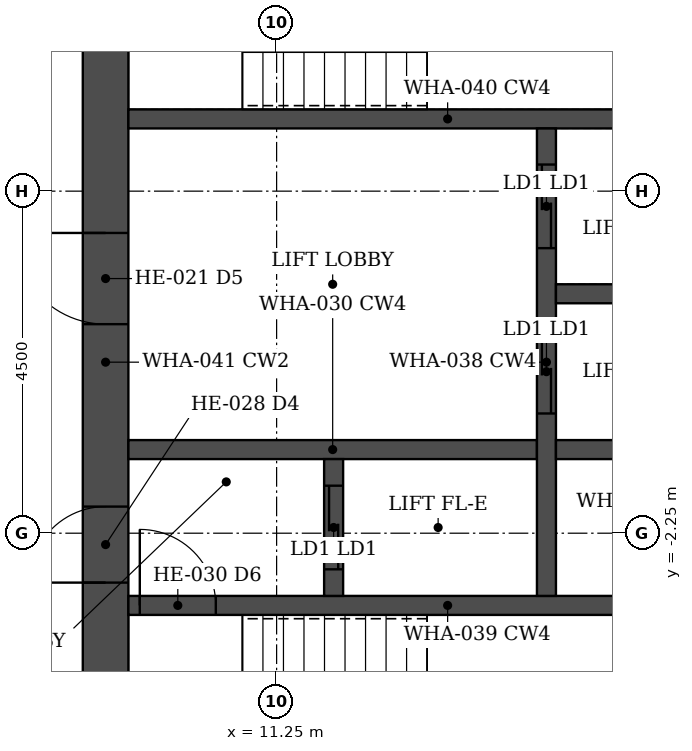
"""IFC4 building model, lengths in metres.
Left out: names, types, materials, properties, quantities, classifications, styles, units other than length and angle.
Written with IfcOpenShell. Run it as: python <this file> out.ifc"""

import sys

from ifc_helpers import new_model, si_unit, direction, frame, frame_2d, origin, place, context, subcontext, project, spatial, rectangle, extrude, element, fill, save


model = new_model("IFC4")
c1 = context("Model", 3, precision=1e-05, world=origin(), true_north=direction((0.0, 1.0)))
c2 = subcontext(c1, "Body", "Model", "MODEL_VIEW")
j1 = project(units=[si_unit("LENGTHUNIT", "METRE"), si_unit("PLANEANGLEUNIT", "RADIAN")], contexts=[c1])
p1 = place(None, origin())
s1 = spatial("IfcSite", under=j1, at=p1, CompositionType="ELEMENT")
p2 = place(p1, origin())
s2 = spatial("IfcBuilding", under=s1, at=p2, CompositionType="ELEMENT")
p3 = place(p2, frame((0.0, 0.0, 161.6)))
s3 = spatial("IfcBuildingStorey", under=s2, at=p3, CompositionType="ELEMENT", Elevation=161.6)
p4 = place(p3, frame((9.0, -6.45, 0.0), z_axis=(0.0, 0.0, 1.0), x_axis=(0.0, 1.0, 0.0)))
e1 = element("IfcWall", 1, at=p4, inside=s3, PredefinedType="SHEAR", context=c2, shape_type="SweptSolid", body=[
    extrude(rectangle(XDim=12.9, YDim=0.6, at=frame_2d((6.45, 0.0))), origin(), (0.0, 0.0, 1.0), 3.6),
])
p5 = place(p4, frame((3.55, 0.0, 0.0)))
e2 = element("IfcOpeningElement", 2, at=p5, cuts=e1, PredefinedType="OPENING", context=c2, shape_type="SweptSolid", body=[
    extrude(rectangle(XDim=1.0, YDim=2.1, at=frame_2d((0.5, 1.05))), frame((0.0, 0.31, 0.0), z_axis=(0.0, -1.0, 0.0), x_axis=(1.0, 0.0, 0.0)), (0.0, 0.0, 1.0), 0.62),
])
p6 = place(p4, frame((6.95, 0.0, 0.0)))
e3 = element("IfcOpeningElement", 3, at=p6, cuts=e1, PredefinedType="OPENING", context=c2, shape_type="SweptSolid", body=[
    extrude(rectangle(XDim=1.2, YDim=2.1, at=frame_2d((0.6, 1.05))), frame((0.0, 0.31, 0.0), z_axis=(0.0, -1.0, 0.0), x_axis=(1.0, 0.0, 0.0)), (0.0, 0.0, 1.0), 0.62),
])
p7 = place(p4, frame((10.85, 0.0, 0.0)))
e4 = element("IfcOpeningElement", 4, at=p7, cuts=e1, PredefinedType="OPENING", context=c2, shape_type="SweptSolid", body=[
    extrude(rectangle(XDim=1.0, YDim=2.1, at=frame_2d((0.5, 1.05))), frame((0.0, 0.31, 0.0), z_axis=(0.0, -1.0, 0.0), x_axis=(1.0, 0.0, 0.0)), (0.0, 0.0, 1.0), 0.62),
])
p8 = place(p3, frame((9.3, -3.2, 0.0), z_axis=(0.0, 0.0, 1.0), x_axis=(1.0, 0.0, 0.0)))
e5 = element("IfcWall", 5, at=p8, inside=s3, PredefinedType="SHEAR", context=c2, shape_type="SweptSolid", body=[
    extrude(rectangle(XDim=8.4, YDim=0.25, at=frame_2d((4.2, 0.0))), origin(), (0.0, 0.0, 1.0), 3.6),
])
p9 = place(p8, frame((0.15, 0.0, 0.0)))
e6 = element("IfcOpeningElement", 6, at=p9, cuts=e5, PredefinedType="OPENING", context=c2, shape_type="SweptSolid", body=[
    extrude(rectangle(XDim=1.0, YDim=2.1, at=frame_2d((0.5, 1.05))), frame((0.0, 0.135, 0.0), z_axis=(0.0, -1.0, 0.0), x_axis=(1.0, 0.0, 0.0)), (0.0, 0.0, 1.0), 0.27),
])
p10 = place(p3, frame((9.3, 3.2, 0.0), z_axis=(0.0, 0.0, 1.0), x_axis=(1.0, 0.0, 0.0)))
e7 = element("IfcWall", 7, at=p10, inside=s3, PredefinedType="SHEAR", context=c2, shape_type="SweptSolid", body=[
    extrude(rectangle(XDim=8.4, YDim=0.25, at=frame_2d((4.2, 0.0))), origin(), (0.0, 0.0, 1.0), 3.6),
])
p11 = place(p3, frame((9.3, -1.15, 0.0), z_axis=(0.0, 0.0, 1.0), x_axis=(1.0, 0.0, 0.0)))
e8 = element("IfcWall", 8, at=p11, inside=s3, PredefinedType="SHEAR", context=c2, shape_type="SweptSolid", body=[
    extrude(rectangle(XDim=5.375, YDim=0.25, at=frame_2d((2.688, 0.0))), origin(), (0.0, 0.0, 1.0), 3.6),
])
p12 = place(p3, frame((12.0, -3.075, 0.0), z_axis=(0.0, 0.0, 1.0), x_axis=(0.0, 1.0, 0.0)))
e9 = element("IfcWall", 9, at=p12, inside=s3, PredefinedType="SHEAR", context=c2, shape_type="SweptSolid", body=[
    extrude(rectangle(XDim=1.8, YDim=0.25, at=frame_2d((0.9, 0.0))), origin(), (0.0, 0.0, 1.0), 3.6),
])
p13 = place(p12, frame((0.35, 0.0, 0.0)))
e10 = element("IfcOpeningElement", 10, at=p13, cuts=e9, PredefinedType="OPENING", context=c2, shape_type="SweptSolid", body=[
    extrude(rectangle(XDim=1.1, YDim=2.1, at=frame_2d((0.55, 1.05))), frame((0.0, 0.135, 0.0), z_axis=(0.0, -1.0, 0.0), x_axis=(1.0, 0.0, 0.0)), (0.0, 0.0, 1.0), 0.27),
])
p14 = place(p3, frame((14.8, -3.075, 0.0), z_axis=(0.0, 0.0, 1.0), x_axis=(0.0, 1.0, 0.0)))
e11 = element("IfcWall", 11, at=p14, inside=s3, PredefinedType="SHEAR", context=c2, shape_type="SweptSolid", body=[
    extrude(rectangle(XDim=6.15, YDim=0.25, at=frame_2d((3.075, 0.0))), origin(), (0.0, 0.0, 1.0), 3.6),
])
p15 = place(p14, frame((2.4, 0.0, 0.0)))
e12 = element("IfcOpeningElement", 12, at=p15, cuts=e11, PredefinedType="OPENING", context=c2, shape_type="SweptSolid", body=[
    extrude(rectangle(XDim=1.1, YDim=2.1, at=frame_2d((0.55, 1.05))), frame((0.0, 0.135, 0.0), z_axis=(0.0, -1.0, 0.0), x_axis=(1.0, 0.0, 0.0)), (0.0, 0.0, 1.0), 0.27),
])
p16 = place(p14, frame((4.575, 0.0, 0.0)))
e13 = element("IfcOpeningElement", 13, at=p16, cuts=e11, PredefinedType="OPENING", context=c2, shape_type="SweptSolid", body=[
    extrude(rectangle(XDim=1.1, YDim=2.1, at=frame_2d((0.55, 1.05))), frame((0.0, 0.135, 0.0), z_axis=(0.0, -1.0, 0.0), x_axis=(1.0, 0.0, 0.0)), (0.0, 0.0, 1.0), 0.27),
])
for number, where, z_axis, x_axis in (
    (14, (14.925, -1.15, 0.0), (0.0, 0.0, 1.0), (1.0, 0.0, 0.0)),
    (15, (14.925, 0.9, 0.0), (0.0, 0.0, 1.0), (1.0, 0.0, 0.0)),
):
    element("IfcWall", number, at=place(p3, frame(where, z_axis=z_axis, x_axis=x_axis)), inside=s3, PredefinedType="SHEAR", context=c2, shape_type="SweptSolid", body=[
        extrude(rectangle(XDim=2.775, YDim=0.25, at=frame_2d((1.387, 0.0))), origin(), (0.0, 0.0, 1.0), 3.6),
    ])
p17 = place(p5, origin())
e16 = element("IfcDoor", 16, at=p17, inside=s3, OperationType="SINGLE_SWING_LEFT", PredefinedType="DOOR", context=c2, shape_type="SweptSolid", body=[
    extrude(rectangle(XDim=1.0, YDim=2.1, at=frame_2d((0.5, 1.05))), frame((0.0, 0.025, 0.0), z_axis=(0.0, -1.0, 0.0), x_axis=(1.0, 0.0, 0.0)), (0.0, 0.0, 1.0), 0.05),
])
fill(e2, e16)
p18 = place(p9, origin())
e17 = element("IfcDoor", 17, at=p18, inside=s3, OperationType="SINGLE_SWING_LEFT", PredefinedType="DOOR", context=c2, shape_type="SweptSolid", body=[
    extrude(rectangle(XDim=1.0, YDim=2.1, at=frame_2d((0.5, 1.05))), frame((0.0, 0.025, 0.0), z_axis=(0.0, -1.0, 0.0), x_axis=(1.0, 0.0, 0.0)), (0.0, 0.0, 1.0), 0.05),
])
fill(e6, e17)
p19 = place(p6, origin())
e18 = element("IfcDoor", 18, at=p19, inside=s3, OperationType="SINGLE_SWING_RIGHT", PredefinedType="DOOR", context=c2, shape_type="SweptSolid", body=[
    extrude(rectangle(XDim=1.2, YDim=2.1, at=frame_2d((0.6, 1.05))), frame((0.0, 0.025, 0.0), z_axis=(0.0, -1.0, 0.0), x_axis=(1.0, 0.0, 0.0)), (0.0, 0.0, 1.0), 0.05),
])
fill(e3, e18)
p20 = place(p13, origin())
e19 = element("IfcDoor", 19, at=p20, inside=s3, OperationType="DOUBLE_DOOR_SLIDING", PredefinedType="DOOR", context=c2, shape_type="SweptSolid", body=[
    extrude(rectangle(XDim=1.1, YDim=2.1, at=frame_2d((0.55, 1.05))), frame((0.0, 0.025, 0.0), z_axis=(0.0, -1.0, 0.0), x_axis=(1.0, 0.0, 0.0)), (0.0, 0.0, 1.0), 0.05),
])
fill(e10, e19)
p21 = place(p15, origin())
e20 = element("IfcDoor", 20, at=p21, inside=s3, OperationType="DOUBLE_DOOR_SLIDING", PredefinedType="DOOR", context=c2, shape_type="SweptSolid", body=[
    extrude(rectangle(XDim=1.1, YDim=2.1, at=frame_2d((0.55, 1.05))), frame((0.0, 0.025, 0.0), z_axis=(0.0, -1.0, 0.0), x_axis=(1.0, 0.0, 0.0)), (0.0, 0.0, 1.0), 0.05),
])
fill(e12, e20)
p22 = place(p16, origin())
e21 = element("IfcDoor", 21, at=p22, inside=s3, OperationType="DOUBLE_DOOR_SLIDING", PredefinedType="DOOR", context=c2, shape_type="SweptSolid", body=[
    extrude(rectangle(XDim=1.1, YDim=2.1, at=frame_2d((0.55, 1.05))), frame((0.0, 0.025, 0.0), z_axis=(0.0, -1.0, 0.0), x_axis=(1.0, 0.0, 0.0)), (0.0, 0.0, 1.0), 0.05),
])
fill(e13, e21)
save(model, sys.argv[1])
